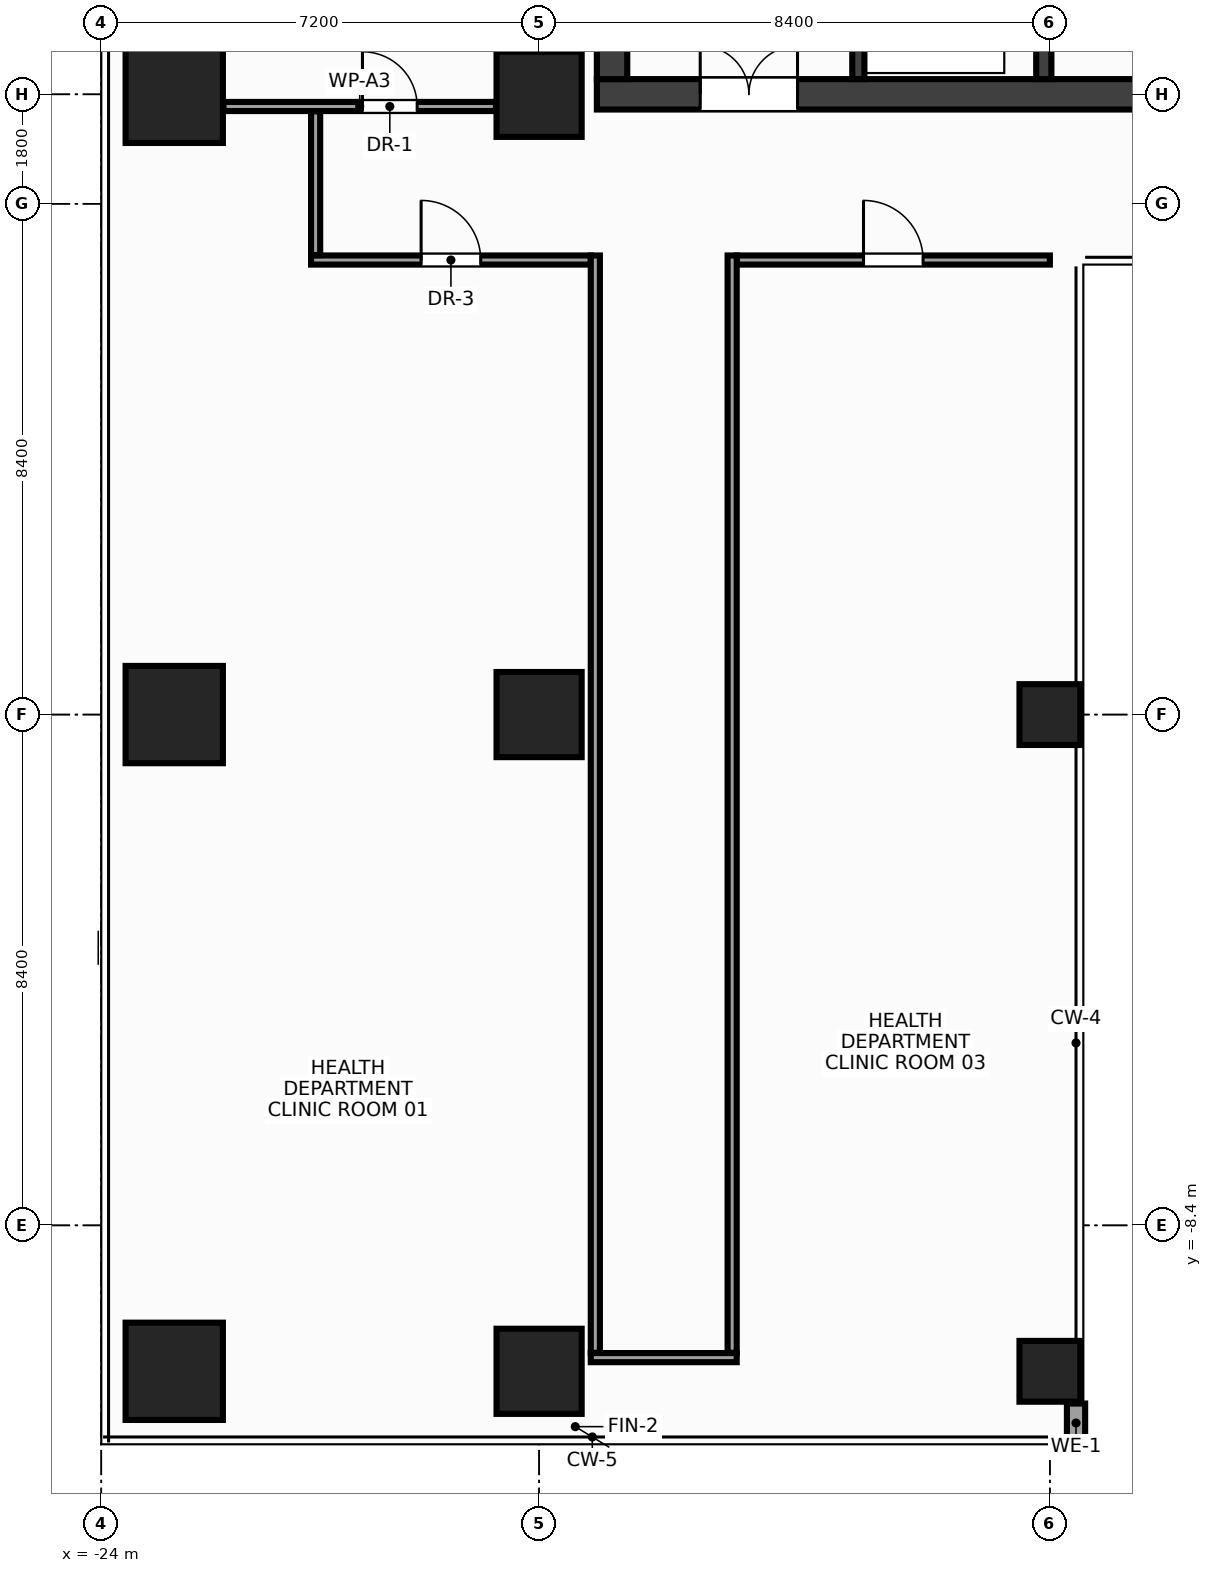
"""IFC4 building model, lengths in metres.
Left out: names, types, materials, properties, quantities, classifications, styles, units other than length and angle.
Written with IfcOpenShell. Run it as: python <this file> out.ifc"""

import sys

from ifc_helpers import new_model, si_unit, direction, frame, frame_2d, origin, origin_2d, place, context, subcontext, project, spatial, rectangle, hollow_rectangle, extrude, source, transform, mapped, element, fill, save


model = new_model("IFC4")
c1 = context("Model", 3, precision=1e-05, world=origin(), true_north=direction((0.0, 1.0)))
c2 = subcontext(c1, "Body", "Model", "MODEL_VIEW")
j1 = project(units=[si_unit("LENGTHUNIT", "METRE"), si_unit("PLANEANGLEUNIT", "RADIAN")], contexts=[c1])
p1 = place(None, origin())
s1 = spatial("IfcSite", under=j1, at=p1, CompositionType="ELEMENT")
p2 = place(p1, origin())
s2 = spatial("IfcBuilding", under=s1, at=p2, CompositionType="ELEMENT")
p3 = place(p2, frame((0.0, 0.0, 214.4)))
s3 = spatial("IfcBuildingStorey", under=s2, at=p3, CompositionType="ELEMENT", Elevation=214.4)
m1 = source(origin(), c2, "Body", "SweptSolid", [
    extrude(rectangle(XDim=31.7, YDim=0.5, at=frame_2d((15.85, 0.0))), origin(), (0.0, 0.0, 1.0), 3.6),
])
p4 = place(p3, frame((-15.85, 10.2, 0.0), z_axis=(0.0, 0.0, 1.0), x_axis=(1.0, 0.0, 0.0)))
e1 = element("IfcWall", 1, at=p4, inside=s3, PredefinedType="SHEAR", context=c2, shape_type="MappedRepresentation", body=[
    mapped(m1, transform((0.0, 0.0, 0.0), x_axis=(1.0, 0.0, 0.0), y_axis=(0.0, 1.0, 0.0), z_axis=(0.0, 0.0, 1.0), scale=1.0)),
])
p5 = place(p4, frame((1.7, 0.0, 0.0)))
e2 = element("IfcOpeningElement", 2, at=p5, cuts=e1, PredefinedType="OPENING", context=c2, shape_type="SweptSolid", body=[
    extrude(rectangle(XDim=1.6, YDim=2.15, at=frame_2d((0.8, 1.075))), frame((0.0, 0.262, 0.0), z_axis=(0.0, -1.0, 0.0), x_axis=(1.0, 0.0, 0.0)), (0.0, 0.0, 1.0), 0.524),
])
p6 = place(p4, frame((28.4, 0.0, 0.0)))
e3 = element("IfcOpeningElement", 3, at=p6, cuts=e1, PredefinedType="OPENING", context=c2, shape_type="SweptSolid", body=[
    extrude(rectangle(XDim=1.6, YDim=2.15, at=frame_2d((0.8, 1.075))), frame((0.0, 0.262, 0.0), z_axis=(0.0, -1.0, 0.0), x_axis=(1.0, 0.0, 0.0)), (0.0, 0.0, 1.0), 0.524),
])
p7 = place(p4, frame((15.1, 0.0, 0.0)))
e4 = element("IfcOpeningElement", 4, at=p7, cuts=e1, PredefinedType="OPENING", context=c2, shape_type="SweptSolid", body=[
    extrude(rectangle(XDim=1.5, YDim=2.2, at=frame_2d((0.75, 1.1))), frame((0.0, 0.262, 0.0), z_axis=(0.0, -1.0, 0.0), x_axis=(1.0, 0.0, 0.0)), (0.0, 0.0, 1.0), 0.524),
])
m2 = source(origin(), c2, "Body", "SweptSolid", [
    extrude(rectangle(XDim=13.1, YDim=0.5, at=frame_2d((6.55, 0.0))), origin(), (0.0, 0.0, 1.0), 3.6),
])
p8 = place(p3, frame((-15.6, 10.45, 0.0), z_axis=(0.0, 0.0, 1.0), x_axis=(0.0, 1.0, 0.0)))
e5 = element("IfcWall", 5, at=p8, inside=s3, PredefinedType="SHEAR", context=c2, shape_type="MappedRepresentation", body=[
    mapped(m2, transform((0.0, 0.0, 0.0), x_axis=(1.0, 0.0, 0.0), y_axis=(0.0, 1.0, 0.0), z_axis=(0.0, 0.0, 1.0), scale=1.0)),
])
m3 = source(origin(), c2, "Body", "SweptSolid", [
    extrude(rectangle(XDim=13.1, YDim=0.25, at=frame_2d((6.55, 0.0))), origin(), (0.0, 0.0, 1.0), 3.6),
])
p9 = place(p3, frame((-8.5, 10.45, 0.0), z_axis=(0.0, 0.0, 1.0), x_axis=(0.0, 1.0, 0.0)))
e6 = element("IfcWall", 6, at=p9, inside=s3, PredefinedType="SHEAR", context=c2, shape_type="MappedRepresentation", body=[
    mapped(m3, transform((0.0, 0.0, 0.0), x_axis=(1.0, 0.0, 0.0), y_axis=(0.0, 1.0, 0.0), z_axis=(0.0, 0.0, 1.0), scale=1.0)),
])
p10 = place(p9, frame((4.22, 0.0, 0.0)))
e7 = element("IfcOpeningElement", 7, at=p10, cuts=e6, PredefinedType="OPENING", context=c2, shape_type="SweptSolid", body=[
    extrude(rectangle(XDim=1.1, YDim=2.15, at=frame_2d((0.55, 1.075))), frame((0.0, 0.137, 0.0), z_axis=(0.0, -1.0, 0.0), x_axis=(1.0, 0.0, 0.0)), (0.0, 0.0, 1.0), 0.274),
])
p11 = place(p9, frame((6.14, 0.0, 0.0)))
e8 = element("IfcOpeningElement", 8, at=p11, cuts=e6, PredefinedType="OPENING", context=c2, shape_type="SweptSolid", body=[
    extrude(rectangle(XDim=1.1, YDim=2.15, at=frame_2d((0.55, 1.075))), frame((0.0, 0.137, 0.0), z_axis=(0.0, -1.0, 0.0), x_axis=(1.0, 0.0, 0.0)), (0.0, 0.0, 1.0), 0.274),
])
p12 = place(p9, frame((8.06, 0.0, 0.0)))
e9 = element("IfcOpeningElement", 9, at=p12, cuts=e6, PredefinedType="OPENING", context=c2, shape_type="SweptSolid", body=[
    extrude(rectangle(XDim=1.1, YDim=2.15, at=frame_2d((0.55, 1.075))), frame((0.0, 0.137, 0.0), z_axis=(0.0, -1.0, 0.0), x_axis=(1.0, 0.0, 0.0)), (0.0, 0.0, 1.0), 0.274),
])
m4 = source(origin(), c2, "Body", "SweptSolid", [
    extrude(rectangle(XDim=3.2, YDim=0.2, at=frame_2d((1.6, 0.0))), origin(), (0.0, 0.0, 1.0), 3.6),
])
p13 = place(p3, frame((-11.55, 10.45, 0.0), z_axis=(0.0, 0.0, 1.0), x_axis=(0.0, 1.0, 0.0)))
e10 = element("IfcWall", 10, at=p13, inside=s3, PredefinedType="SHEAR", context=c2, shape_type="MappedRepresentation", body=[
    mapped(m4, transform((0.0, 0.0, 0.0), x_axis=(1.0, 0.0, 0.0), y_axis=(0.0, 1.0, 0.0), z_axis=(0.0, 0.0, 1.0), scale=1.0)),
])
p14 = place(p13, frame((0.9, 0.0, 0.0)))
e11 = element("IfcOpeningElement", 11, at=p14, cuts=e10, PredefinedType="OPENING", context=c2, shape_type="SweptSolid", body=[
    extrude(rectangle(XDim=1.1, YDim=2.15, at=frame_2d((0.55, 1.075))), frame((0.0, 0.112, 0.0), z_axis=(0.0, -1.0, 0.0), x_axis=(1.0, 0.0, 0.0)), (0.0, 0.0, 1.0), 0.224),
])
m5 = source(origin(), c2, "Body", "SweptSolid", [
    extrude(rectangle(XDim=1.4, YDim=1.4, at=origin_2d()), origin(), (0.0, 0.0, 1.0), 3.6),
])
for number, where, z_axis, x_axis in (
    (12, (-16.8, -10.8, 0.0), (0.0, 0.0, 1.0), (1.0, 0.0, 0.0)),
    (13, (-16.8, 0.0, 0.0), (0.0, 0.0, 1.0), (1.0, 0.0, 0.0)),
    (14, (-16.8, 10.2, 0.0), (0.0, 0.0, 1.0), (1.0, 0.0, 0.0)),
):
    element("IfcColumn", number, at=place(p3, frame(where, z_axis=z_axis, x_axis=x_axis)), inside=s3, PredefinedType="COLUMN", context=c2, shape_type="MappedRepresentation", body=[
        mapped(m5, transform((0.0, 0.0, 0.0), x_axis=(1.0, 0.0, 0.0), y_axis=(0.0, 1.0, 0.0), z_axis=(0.0, 0.0, 1.0), scale=1.0)),
    ])
m6 = source(origin(), c2, "Body", "SweptSolid", [
    extrude(rectangle(XDim=1.6, YDim=1.6, at=origin_2d()), origin(), (0.0, 0.0, 1.0), 3.6),
])
for number, where, z_axis, x_axis in (
    (15, (-22.8, -10.8, 0.0), (0.0, 0.0, 1.0), (1.0, 0.0, 0.0)),
    (16, (-22.8, 0.0, 0.0), (0.0, 0.0, 1.0), (1.0, 0.0, 0.0)),
    (17, (-22.8, 10.2, 0.0), (0.0, 0.0, 1.0), (1.0, 0.0, 0.0)),
):
    element("IfcColumn", number, at=place(p3, frame(where, z_axis=z_axis, x_axis=x_axis)), inside=s3, PredefinedType="COLUMN", context=c2, shape_type="MappedRepresentation", body=[
        mapped(m6, transform((0.0, 0.0, 0.0), x_axis=(1.0, 0.0, 0.0), y_axis=(0.0, 1.0, 0.0), z_axis=(0.0, 0.0, 1.0), scale=1.0)),
    ])
m7 = source(origin(), c2, "Body", "SweptSolid", [
    extrude(hollow_rectangle(XDim=1.0, YDim=1.0, WallThickness=0.045, at=origin_2d()), origin(), (0.0, 0.0, 1.0), 3.6),
])
for number, where, z_axis, x_axis in (
    (18, (-8.4, 0.0, 0.0), (0.0, 0.0, 1.0), (1.0, 0.0, 0.0)),
    (19, (-8.4, -10.8, 0.0), (0.0, 0.0, 1.0), (1.0, 0.0, 0.0)),
):
    element("IfcColumn", number, at=place(p3, frame(where, z_axis=z_axis, x_axis=x_axis)), inside=s3, PredefinedType="COLUMN", context=c2, shape_type="MappedRepresentation", body=[
        mapped(m7, transform((0.0, 0.0, 0.0), x_axis=(1.0, 0.0, 0.0), y_axis=(0.0, 1.0, 0.0), z_axis=(0.0, 0.0, 1.0), scale=1.0)),
    ])
m8 = source(origin(), c2, "Body", "SweptSolid", [
    extrude(rectangle(XDim=0.64, YDim=0.24, at=frame_2d((0.32, 0.0))), origin(), (0.0, 0.0, 1.0), 2.76),
])
p15 = place(p3, frame((-7.97, -11.97, 0.0), z_axis=(0.0, 0.0, 1.0), x_axis=(0.0, 1.0, 0.0)))
e20 = element("IfcWall", 20, at=p15, inside=s3, PredefinedType="STANDARD", context=c2, shape_type="MappedRepresentation", body=[
    mapped(m8, transform((0.0, 0.0, 0.0), x_axis=(1.0, 0.0, 0.0), y_axis=(0.0, 1.0, 0.0), z_axis=(0.0, 0.0, 1.0), scale=1.0)),
])
m9 = source(origin(), c2, "Body", "SweptSolid", [
    extrude(rectangle(XDim=4.48, YDim=0.15, at=frame_2d((2.24, 0.0))), origin(), (0.0, 0.0, 1.0), 2.915),
])
p16 = place(p3, frame((-21.99, 10.0, 0.0), z_axis=(0.0, 0.0, 1.0), x_axis=(1.0, 0.0, 0.0)))
e21 = element("IfcWall", 21, at=p16, inside=s3, PredefinedType="PARTITIONING", context=c2, shape_type="MappedRepresentation", body=[
    mapped(m9, transform((0.0, 0.0, 0.0), x_axis=(1.0, 0.0, 0.0), y_axis=(0.0, 1.0, 0.0), z_axis=(0.0, 0.0, 1.0), scale=1.0)),
])
p17 = place(p16, frame((2.285, 0.0, 0.0)))
e22 = element("IfcOpeningElement", 22, at=p17, cuts=e21, PredefinedType="OPENING", context=c2, shape_type="SweptSolid", body=[
    extrude(rectangle(XDim=0.9, YDim=2.15, at=frame_2d((0.45, 1.075))), frame((0.0, 0.087, 0.0), z_axis=(0.0, -1.0, 0.0), x_axis=(1.0, 0.0, 0.0)), (0.0, 0.0, 1.0), 0.174),
])
m10 = source(origin(), c2, "Body", "SweptSolid", [
    extrude(rectangle(XDim=4.6, YDim=0.15, at=frame_2d((2.3, 0.0))), origin(), (0.0, 0.0, 1.0), 2.765),
])
p18 = place(p3, frame((-20.55, 7.475, 0.0), z_axis=(0.0, 0.0, 1.0), x_axis=(1.0, 0.0, 0.0)))
e23 = element("IfcWall", 23, at=p18, inside=s3, PredefinedType="PARTITIONING", context=c2, shape_type="MappedRepresentation", body=[
    mapped(m10, transform((0.0, 0.0, 0.0), x_axis=(1.0, 0.0, 0.0), y_axis=(0.0, 1.0, 0.0), z_axis=(0.0, 0.0, 1.0), scale=1.0)),
])
p19 = place(p18, frame((1.81, 0.0, 0.0)))
e24 = element("IfcOpeningElement", 24, at=p19, cuts=e23, PredefinedType="OPENING", context=c2, shape_type="SweptSolid", body=[
    extrude(rectangle(XDim=0.98, YDim=2.15, at=frame_2d((0.49, 1.075))), frame((0.0, 0.087, 0.0), z_axis=(0.0, -1.0, 0.0), x_axis=(1.0, 0.0, 0.0)), (0.0, 0.0, 1.0), 0.174),
])
m11 = source(origin(), c2, "Body", "SweptSolid", [
    extrude(rectangle(XDim=5.15, YDim=0.15, at=frame_2d((2.575, 0.0))), origin(), (0.0, 0.0, 1.0), 3.38),
])
p20 = place(p3, frame((-13.55, 7.475, 0.0), z_axis=(0.0, 0.0, 1.0), x_axis=(1.0, 0.0, 0.0)))
e25 = element("IfcWall", 25, at=p20, inside=s3, PredefinedType="PARTITIONING", context=c2, shape_type="MappedRepresentation", body=[
    mapped(m11, transform((0.0, 0.0, 0.0), x_axis=(1.0, 0.0, 0.0), y_axis=(0.0, 1.0, 0.0), z_axis=(0.0, 0.0, 1.0), scale=1.0)),
])
p21 = place(p20, frame((2.085, 0.0, 0.0)))
e26 = element("IfcOpeningElement", 26, at=p21, cuts=e25, PredefinedType="OPENING", context=c2, shape_type="SweptSolid", body=[
    extrude(rectangle(XDim=0.98, YDim=2.15, at=frame_2d((0.49, 1.075))), frame((0.0, 0.087, 0.0), z_axis=(0.0, -1.0, 0.0), x_axis=(1.0, 0.0, 0.0)), (0.0, 0.0, 1.0), 0.174),
])
m12 = source(origin(), c2, "Body", "SweptSolid", [
    extrude(rectangle(XDim=2.4, YDim=0.15, at=frame_2d((1.2, 0.0))), origin(), (0.0, 0.0, 1.0), 2.915),
])
p22 = place(p3, frame((-15.95, -10.575, 0.0), z_axis=(0.0, 0.0, 1.0), x_axis=(1.0, 0.0, 0.0)))
e27 = element("IfcWall", 27, at=p22, inside=s3, PredefinedType="PARTITIONING", context=c2, shape_type="MappedRepresentation", body=[
    mapped(m12, transform((0.0, 0.0, 0.0), x_axis=(1.0, 0.0, 0.0), y_axis=(0.0, 1.0, 0.0), z_axis=(0.0, 0.0, 1.0), scale=1.0)),
])
m13 = source(origin(), c2, "Body", "SweptSolid", [
    extrude(rectangle(XDim=2.365, YDim=0.15, at=frame_2d((1.183, 0.0))), origin(), (0.0, 0.0, 1.0), 3.38),
])
p23 = place(p3, frame((-20.475, 7.555, 0.0), z_axis=(0.0, 0.0, 1.0), x_axis=(0.0, 1.0, 0.0)))
e28 = element("IfcWall", 28, at=p23, inside=s3, PredefinedType="PARTITIONING", context=c2, shape_type="MappedRepresentation", body=[
    mapped(m13, transform((0.0, 0.0, 0.0), x_axis=(1.0, 0.0, 0.0), y_axis=(0.0, 1.0, 0.0), z_axis=(0.0, 0.0, 1.0), scale=1.0)),
])
m14 = source(origin(), c2, "Body", "SweptSolid", [
    extrude(rectangle(XDim=18.045, YDim=0.15, at=frame_2d((9.022, 0.0))), origin(), (0.0, 0.0, 1.0), 2.915),
])
for number, where, z_axis, x_axis in (
    (29, (-15.875, -10.495, 0.0), (0.0, 0.0, 1.0), (0.0, 1.0, 0.0)),
    (30, (-13.625, -10.495, 0.0), (0.0, 0.0, 1.0), (0.0, 1.0, 0.0)),
):
    element("IfcWall", number, at=place(p3, frame(where, z_axis=z_axis, x_axis=x_axis)), inside=s3, PredefinedType="PARTITIONING", context=c2, shape_type="MappedRepresentation", body=[
        mapped(m14, transform((0.0, 0.0, 0.0), x_axis=(1.0, 0.0, 0.0), y_axis=(0.0, 1.0, 0.0), z_axis=(0.0, 0.0, 1.0), scale=1.0)),
    ])
m15 = source(origin(), c2, "Body", "SweptSolid", [
    extrude(rectangle(XDim=1.6, YDim=2.15, at=frame_2d((0.8, 1.075))), frame((0.0, 0.025, 0.0), z_axis=(0.0, -1.0, 0.0), x_axis=(1.0, 0.0, 0.0)), (0.0, 0.0, 1.0), 0.05),
])
p24 = place(p5, origin())
e31 = element("IfcDoor", 31, at=p24, inside=s3, OperationType="DOUBLE_DOOR_SINGLE_SWING", PredefinedType="DOOR", context=c2, shape_type="MappedRepresentation", body=[
    mapped(m15, transform((0.0, 0.0, 0.0), x_axis=(1.0, 0.0, 0.0), y_axis=(0.0, 1.0, 0.0), z_axis=(0.0, 0.0, 1.0), scale=1.0)),
])
fill(e2, e31)
m16 = source(origin(), c2, "Body", "SweptSolid", [
    extrude(rectangle(XDim=0.9, YDim=2.15, at=frame_2d((0.45, 1.075))), frame((0.0, 0.025, 0.0), z_axis=(0.0, -1.0, 0.0), x_axis=(1.0, 0.0, 0.0)), (0.0, 0.0, 1.0), 0.05),
])
p25 = place(p17, origin())
e32 = element("IfcDoor", 32, at=p25, inside=s3, OperationType="SINGLE_SWING_LEFT", PredefinedType="DOOR", context=c2, shape_type="MappedRepresentation", body=[
    mapped(m16, transform((0.0, 0.0, 0.0), x_axis=(1.0, 0.0, 0.0), y_axis=(0.0, 1.0, 0.0), z_axis=(0.0, 0.0, 1.0), scale=1.0)),
])
fill(e22, e32)
m17 = source(origin(), c2, "Body", "SweptSolid", [
    extrude(rectangle(XDim=0.98, YDim=2.15, at=frame_2d((0.49, 1.075))), frame((0.0, 0.025, 0.0), z_axis=(0.0, -1.0, 0.0), x_axis=(1.0, 0.0, 0.0)), (0.0, 0.0, 1.0), 0.05),
])
p26 = place(p19, origin())
e33 = element("IfcDoor", 33, at=p26, inside=s3, OperationType="SINGLE_SWING_LEFT", PredefinedType="DOOR", context=c2, shape_type="MappedRepresentation", body=[
    mapped(m17, transform((0.0, 0.0, 0.0), x_axis=(1.0, 0.0, 0.0), y_axis=(0.0, 1.0, 0.0), z_axis=(0.0, 0.0, 1.0), scale=1.0)),
])
fill(e24, e33)
p27 = place(p21, origin())
e34 = element("IfcDoor", 34, at=p27, inside=s3, OperationType="SINGLE_SWING_LEFT", PredefinedType="DOOR", context=c2, shape_type="MappedRepresentation", body=[
    mapped(m17, transform((0.0, 0.0, 0.0), x_axis=(1.0, 0.0, 0.0), y_axis=(0.0, 1.0, 0.0), z_axis=(0.0, 0.0, 1.0), scale=1.0)),
])
fill(e26, e34)
save(model, sys.argv[1])
